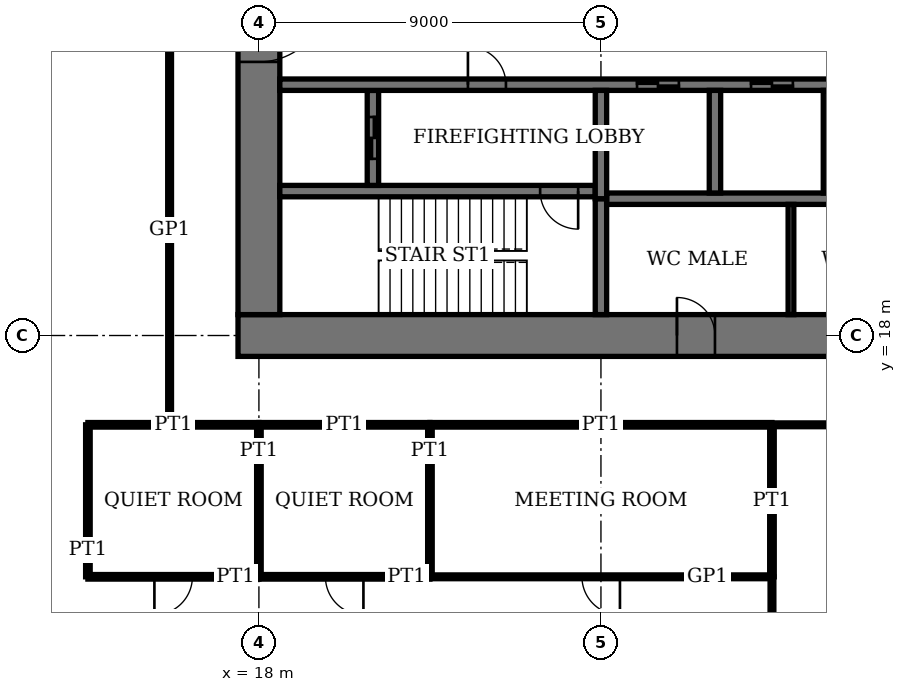
"""IFC4 building model, lengths in metres.
Left out: names, types, materials, properties, quantities, classifications, styles, units other than length and angle.
Written with IfcOpenShell. Run it as: python <this file> out.ifc"""

import sys

from ifc_helpers import new_model, si_unit, direction, frame, frame_2d, origin, place, context, subcontext, project, spatial, rectangle, extrude, element, fill, save


model = new_model("IFC4")
c1 = context("Model", 3, precision=1e-05, world=origin(), true_north=direction((0.0, 1.0)))
c2 = subcontext(c1, "Body", "Model", "MODEL_VIEW")
j1 = project(units=[si_unit("LENGTHUNIT", "METRE"), si_unit("PLANEANGLEUNIT", "RADIAN")], contexts=[c1])
p1 = place(None, origin())
s1 = spatial("IfcSite", under=j1, at=p1, CompositionType="ELEMENT")
p2 = place(p1, origin())
s2 = spatial("IfcBuilding", under=s1, at=p2, CompositionType="ELEMENT")
p3 = place(p2, frame((0.0, 0.0, 59.8)))
s3 = spatial("IfcBuildingStorey", under=s2, at=p3, CompositionType="ELEMENT", Elevation=59.8)
p4 = place(p3, frame((17.45, 18.0, 0.0), z_axis=(0.0, 0.0, 1.0), x_axis=(1.0, 0.0, 0.0)))
e1 = element("IfcWall", 1, at=p4, inside=s3, PredefinedType="SHEAR", context=c2, shape_type="SweptSolid", body=[
    extrude(rectangle(XDim=28.1, YDim=1.1, at=frame_2d((14.05, 0.0))), origin(), (0.0, 0.0, 1.0), 4.0),
])
p5 = place(p4, frame((11.55, 0.0, 0.0)))
e2 = element("IfcOpeningElement", 2, at=p5, cuts=e1, PredefinedType="OPENING", context=c2, shape_type="SweptSolid", body=[
    extrude(rectangle(XDim=1.0, YDim=2.4, at=frame_2d((0.5, 1.2))), frame((0.0, 0.56, 0.0), z_axis=(0.0, -1.0, 0.0), x_axis=(1.0, 0.0, 0.0)), (0.0, 0.0, 1.0), 1.12),
])
p6 = place(p4, frame((16.55, 0.0, 0.0)))
e3 = element("IfcOpeningElement", 3, at=p6, cuts=e1, PredefinedType="OPENING", context=c2, shape_type="SweptSolid", body=[
    extrude(rectangle(XDim=1.0, YDim=2.4, at=frame_2d((0.5, 1.2))), frame((0.0, 0.56, 0.0), z_axis=(0.0, -1.0, 0.0), x_axis=(1.0, 0.0, 0.0)), (0.0, 0.0, 1.0), 1.12),
])
p7 = place(p4, frame((20.0, 0.0, 0.0)))
e4 = element("IfcOpeningElement", 4, at=p7, cuts=e1, PredefinedType="OPENING", context=c2, shape_type="SweptSolid", body=[
    extrude(rectangle(XDim=1.1, YDim=2.4, at=frame_2d((0.55, 1.2))), frame((0.0, 0.56, 0.0), z_axis=(0.0, -1.0, 0.0), x_axis=(1.0, 0.0, 0.0)), (0.0, 0.0, 1.0), 1.12),
])
p8 = place(p4, frame((24.05, 0.0, 0.0)))
e5 = element("IfcOpeningElement", 5, at=p8, cuts=e1, PredefinedType="OPENING", context=c2, shape_type="SweptSolid", body=[
    extrude(rectangle(XDim=1.0, YDim=2.4, at=frame_2d((0.5, 1.2))), frame((0.0, 0.56, 0.0), z_axis=(0.0, -1.0, 0.0), x_axis=(1.0, 0.0, 0.0)), (0.0, 0.0, 1.0), 1.12),
])
p9 = place(p3, frame((18.0, 35.45, 0.0), z_axis=(0.0, 0.0, 1.0), x_axis=(0.0, -1.0, 0.0)))
e6 = element("IfcWall", 6, at=p9, inside=s3, PredefinedType="SHEAR", context=c2, shape_type="SweptSolid", body=[
    extrude(rectangle(XDim=16.9, YDim=1.1, at=frame_2d((8.45, 0.0))), origin(), (0.0, 0.0, 1.0), 4.0),
])
p10 = place(p9, frame((8.45, 0.0, 0.0)))
e7 = element("IfcOpeningElement", 7, at=p10, cuts=e6, PredefinedType="OPENING", context=c2, shape_type="SweptSolid", body=[
    extrude(rectangle(XDim=1.8, YDim=2.4, at=frame_2d((0.9, 1.2))), frame((0.0, 0.56, 0.0), z_axis=(0.0, -1.0, 0.0), x_axis=(1.0, 0.0, 0.0)), (0.0, 0.0, 1.0), 1.12),
])
p11 = place(p3, frame((18.55, 21.8, 0.0), z_axis=(0.0, 0.0, 1.0), x_axis=(1.0, 0.0, 0.0)))
e8 = element("IfcWall", 8, at=p11, inside=s3, PredefinedType="SHEAR", context=c2, shape_type="SweptSolid", body=[
    extrude(rectangle(XDim=8.3, YDim=0.3, at=frame_2d((4.15, 0.0))), origin(), (0.0, 0.0, 1.0), 4.0),
])
p12 = place(p11, frame((6.85, 0.0, 0.0)))
e9 = element("IfcOpeningElement", 9, at=p12, cuts=e8, PredefinedType="OPENING", context=c2, shape_type="SweptSolid", body=[
    extrude(rectangle(XDim=1.0, YDim=2.4, at=frame_2d((0.5, 1.2))), frame((0.0, 0.16, 0.0), z_axis=(0.0, -1.0, 0.0), x_axis=(1.0, 0.0, 0.0)), (0.0, 0.0, 1.0), 0.32),
])
p13 = place(p3, frame((27.0, 18.55, 0.0), z_axis=(0.0, 0.0, 1.0), x_axis=(0.0, 1.0, 0.0)))
e10 = element("IfcWall", 10, at=p13, inside=s3, PredefinedType="SHEAR", context=c2, shape_type="SweptSolid", body=[
    extrude(rectangle(XDim=3.05, YDim=0.3, at=frame_2d((1.525, 0.0))), origin(), (0.0, 0.0, 1.0), 4.0),
])
p14 = place(p3, frame((21.0, 21.95, 0.0), z_axis=(0.0, 0.0, 1.0), x_axis=(0.0, 1.0, 0.0)))
e11 = element("IfcWall", 11, at=p14, inside=s3, PredefinedType="SHEAR", context=c2, shape_type="SweptSolid", body=[
    extrude(rectangle(XDim=2.5, YDim=0.3, at=frame_2d((1.25, 0.0))), origin(), (0.0, 0.0, 1.0), 4.0),
])
p15 = place(p14, frame((0.7, 0.0, 0.0)))
e12 = element("IfcOpeningElement", 12, at=p15, cuts=e11, PredefinedType="OPENING", context=c2, shape_type="SweptSolid", body=[
    extrude(rectangle(XDim=1.1, YDim=2.4, at=frame_2d((0.55, 1.2))), frame((0.0, 0.16, 0.0), z_axis=(0.0, -1.0, 0.0), x_axis=(1.0, 0.0, 0.0)), (0.0, 0.0, 1.0), 0.32),
])
p16 = place(p3, frame((18.55, 24.6, 0.0), z_axis=(0.0, 0.0, 1.0), x_axis=(1.0, 0.0, 0.0)))
e13 = element("IfcWall", 13, at=p16, inside=s3, PredefinedType="SHEAR", context=c2, shape_type="SweptSolid", body=[
    extrude(rectangle(XDim=25.9, YDim=0.3, at=frame_2d((12.95, 0.0))), origin(), (0.0, 0.0, 1.0), 4.0),
])
p17 = place(p16, frame((4.95, 0.0, 0.0)))
e14 = element("IfcOpeningElement", 14, at=p17, cuts=e13, PredefinedType="OPENING", context=c2, shape_type="SweptSolid", body=[
    extrude(rectangle(XDim=1.0, YDim=2.4, at=frame_2d((0.5, 1.2))), frame((0.0, 0.16, 0.0), z_axis=(0.0, -1.0, 0.0), x_axis=(1.0, 0.0, 0.0)), (0.0, 0.0, 1.0), 0.32),
])
p18 = place(p16, frame((24.5, 0.0, 0.0)))
e15 = element("IfcOpeningElement", 15, at=p18, cuts=e13, PredefinedType="OPENING", context=c2, shape_type="SweptSolid", body=[
    extrude(rectangle(XDim=0.9, YDim=2.1, at=frame_2d((0.45, 1.05))), frame((0.0, 0.16, 0.0), z_axis=(0.0, -1.0, 0.0), x_axis=(1.0, 0.0, 0.0)), (0.0, 0.0, 1.0), 0.32),
])
p19 = place(p16, frame((9.4, 0.0, 0.0)))
e16 = element("IfcOpeningElement", 16, at=p19, cuts=e13, PredefinedType="OPENING", context=c2, shape_type="SweptSolid", body=[
    extrude(rectangle(XDim=1.1, YDim=2.4, at=frame_2d((0.55, 1.2))), frame((0.0, 0.16, 0.0), z_axis=(0.0, -1.0, 0.0), x_axis=(1.0, 0.0, 0.0)), (0.0, 0.0, 1.0), 0.32),
])
p20 = place(p16, frame((12.4, 0.0, 0.0)))
e17 = element("IfcOpeningElement", 17, at=p20, cuts=e13, PredefinedType="OPENING", context=c2, shape_type="SweptSolid", body=[
    extrude(rectangle(XDim=1.1, YDim=2.4, at=frame_2d((0.55, 1.2))), frame((0.0, 0.16, 0.0), z_axis=(0.0, -1.0, 0.0), x_axis=(1.0, 0.0, 0.0)), (0.0, 0.0, 1.0), 0.32),
])
p21 = place(p16, frame((15.4, 0.0, 0.0)))
e18 = element("IfcOpeningElement", 18, at=p21, cuts=e13, PredefinedType="OPENING", context=c2, shape_type="SweptSolid", body=[
    extrude(rectangle(XDim=1.1, YDim=2.4, at=frame_2d((0.55, 1.2))), frame((0.0, 0.16, 0.0), z_axis=(0.0, -1.0, 0.0), x_axis=(1.0, 0.0, 0.0)), (0.0, 0.0, 1.0), 0.32),
])
p22 = place(p16, frame((18.4, 0.0, 0.0)))
e19 = element("IfcOpeningElement", 19, at=p22, cuts=e13, PredefinedType="OPENING", context=c2, shape_type="SweptSolid", body=[
    extrude(rectangle(XDim=1.1, YDim=2.4, at=frame_2d((0.55, 1.2))), frame((0.0, 0.16, 0.0), z_axis=(0.0, -1.0, 0.0), x_axis=(1.0, 0.0, 0.0)), (0.0, 0.0, 1.0), 0.32),
])
p23 = place(p16, frame((21.3, 0.0, 0.0)))
e20 = element("IfcOpeningElement", 20, at=p23, cuts=e13, PredefinedType="OPENING", context=c2, shape_type="SweptSolid", body=[
    extrude(rectangle(XDim=1.3, YDim=2.4, at=frame_2d((0.65, 1.2))), frame((0.0, 0.16, 0.0), z_axis=(0.0, -1.0, 0.0), x_axis=(1.0, 0.0, 0.0)), (0.0, 0.0, 1.0), 0.32),
])
p24 = place(p3, frame((27.15, 21.6, 0.0), z_axis=(0.0, 0.0, 1.0), x_axis=(1.0, 0.0, 0.0)))
e21 = element("IfcWall", 21, at=p24, inside=s3, PredefinedType="SHEAR", context=c2, shape_type="SweptSolid", body=[
    extrude(rectangle(XDim=17.3, YDim=0.3, at=frame_2d((8.65, 0.0))), origin(), (0.0, 0.0, 1.0), 4.0),
])
for number, where, z_axis, x_axis in (
    (22, (30.0, 21.75, 0.0), (0.0, 0.0, 1.0), (0.0, 1.0, 0.0)),
    (23, (33.0, 21.75, 0.0), (0.0, 0.0, 1.0), (0.0, 1.0, 0.0)),
):
    element("IfcWall", number, at=place(p3, frame(where, z_axis=z_axis, x_axis=x_axis)), inside=s3, PredefinedType="SHEAR", context=c2, shape_type="SweptSolid", body=[
        extrude(rectangle(XDim=2.7, YDim=0.3, at=frame_2d((1.35, 0.0))), origin(), (0.0, 0.0, 1.0), 4.0),
    ])
p25 = place(p3, frame((27.0, 21.6, 0.0), z_axis=(0.0, 0.0, 1.0), x_axis=(0.0, 1.0, 0.0)))
e24 = element("IfcWall", 24, at=p25, inside=s3, PredefinedType="SHEAR", context=c2, shape_type="SweptSolid", body=[
    extrude(rectangle(XDim=2.85, YDim=0.3, at=frame_2d((1.425, 0.0))), origin(), (0.0, 0.0, 1.0), 4.0),
])
p26 = place(p3, frame((13.5, 11.65, 0.0), z_axis=(0.0, 0.0, 1.0), x_axis=(1.0, 0.0, 0.0)))
e25 = element("IfcWall", 25, at=p26, inside=s3, PredefinedType="PARTITIONING", context=c2, shape_type="SweptSolid", body=[
    extrude(rectangle(XDim=4.5, YDim=0.12, at=frame_2d((2.25, 0.0))), origin(), (0.0, 0.0, 1.0), 3.75),
])
p27 = place(p26, frame((1.75, 0.0, 0.0)))
e26 = element("IfcOpeningElement", 26, at=p27, cuts=e25, PredefinedType="OPENING", context=c2, shape_type="SweptSolid", body=[
    extrude(rectangle(XDim=1.0, YDim=2.4, at=frame_2d((0.5, 1.2))), frame((0.0, 0.07, 0.0), z_axis=(0.0, -1.0, 0.0), x_axis=(1.0, 0.0, 0.0)), (0.0, 0.0, 1.0), 0.14),
])
p28 = place(p3, frame((18.0, 11.65, 0.0), z_axis=(0.0, 0.0, 1.0), x_axis=(1.0, 0.0, 0.0)))
e27 = element("IfcWall", 27, at=p28, inside=s3, PredefinedType="PARTITIONING", context=c2, shape_type="SweptSolid", body=[
    extrude(rectangle(XDim=4.5, YDim=0.12, at=frame_2d((2.25, 0.0))), origin(), (0.0, 0.0, 1.0), 3.75),
])
p29 = place(p28, frame((1.75, 0.0, 0.0)))
e28 = element("IfcOpeningElement", 28, at=p29, cuts=e27, PredefinedType="OPENING", context=c2, shape_type="SweptSolid", body=[
    extrude(rectangle(XDim=1.0, YDim=2.4, at=frame_2d((0.5, 1.2))), frame((0.0, 0.07, 0.0), z_axis=(0.0, -1.0, 0.0), x_axis=(1.0, 0.0, 0.0)), (0.0, 0.0, 1.0), 0.14),
])
p30 = place(p3, frame((22.5, 11.65, 0.0), z_axis=(0.0, 0.0, 1.0), x_axis=(1.0, 0.0, 0.0)))
e29 = element("IfcWall", 29, at=p30, inside=s3, PredefinedType="PARTITIONING", context=c2, shape_type="SweptSolid", body=[
    extrude(rectangle(XDim=9.0, YDim=0.1, at=frame_2d((4.5, 0.0))), origin(), (0.0, 0.0, 1.0), 3.75),
])
p31 = place(p30, frame((4.0, 0.0, 0.0)))
e30 = element("IfcOpeningElement", 30, at=p31, cuts=e29, PredefinedType="OPENING", context=c2, shape_type="SweptSolid", body=[
    extrude(rectangle(XDim=1.0, YDim=2.4, at=frame_2d((0.5, 1.2))), frame((0.0, 0.06, 0.0), z_axis=(0.0, -1.0, 0.0), x_axis=(1.0, 0.0, 0.0)), (0.0, 0.0, 1.0), 0.12),
])
for number, where, z_axis, x_axis in (
    (31, (13.5, 15.65, 0.0), (0.0, 0.0, 1.0), (1.0, 0.0, 0.0)),
    (32, (18.0, 15.65, 0.0), (0.0, 0.0, 1.0), (1.0, 0.0, 0.0)),
):
    element("IfcWall", number, at=place(p3, frame(where, z_axis=z_axis, x_axis=x_axis)), inside=s3, PredefinedType="PARTITIONING", context=c2, shape_type="SweptSolid", body=[
        extrude(rectangle(XDim=4.5, YDim=0.12, at=frame_2d((2.25, 0.0))), origin(), (0.0, 0.0, 1.0), 3.75),
    ])
p32 = place(p3, frame((22.5, 15.65, 0.0), z_axis=(0.0, 0.0, 1.0), x_axis=(1.0, 0.0, 0.0)))
e33 = element("IfcWall", 33, at=p32, inside=s3, PredefinedType="PARTITIONING", context=c2, shape_type="SweptSolid", body=[
    extrude(rectangle(XDim=9.0, YDim=0.12, at=frame_2d((4.5, 0.0))), origin(), (0.0, 0.0, 1.0), 3.75),
])
p33 = place(p3, frame((31.5, 15.65, 0.0), z_axis=(0.0, 0.0, 1.0), x_axis=(1.0, 0.0, 0.0)))
e34 = element("IfcWall", 34, at=p33, inside=s3, PredefinedType="PARTITIONING", context=c2, shape_type="SweptSolid", body=[
    extrude(rectangle(XDim=9.0, YDim=0.1, at=frame_2d((4.5, 0.0))), origin(), (0.0, 0.0, 1.0), 3.75),
])
p34 = place(p33, frame((4.0, 0.0, 0.0)))
e35 = element("IfcOpeningElement", 35, at=p34, cuts=e34, PredefinedType="OPENING", context=c2, shape_type="SweptSolid", body=[
    extrude(rectangle(XDim=1.0, YDim=2.4, at=frame_2d((0.5, 1.2))), frame((0.0, 0.06, 0.0), z_axis=(0.0, -1.0, 0.0), x_axis=(1.0, 0.0, 0.0)), (0.0, 0.0, 1.0), 0.12),
])
p35 = place(p3, frame((13.5, 11.65, 0.0), z_axis=(0.0, 0.0, 1.0), x_axis=(0.0, 1.0, 0.0)))
e36 = element("IfcWall", 36, at=p35, inside=s3, PredefinedType="PARTITIONING", context=c2, shape_type="SweptSolid", body=[
    extrude(rectangle(XDim=4.0, YDim=0.12, at=frame_2d((2.0, 0.0))), origin(), (0.0, 0.0, 1.0), 3.75),
])
p36 = place(p3, frame((15.65, 15.65, 0.0), z_axis=(0.0, 0.0, 1.0), x_axis=(0.0, 1.0, 0.0)))
e37 = element("IfcWall", 37, at=p36, inside=s3, PredefinedType="PARTITIONING", context=c2, shape_type="SweptSolid", body=[
    extrude(rectangle(XDim=20.9, YDim=0.1, at=frame_2d((10.45, 0.0))), origin(), (0.0, 0.0, 1.0), 3.75),
])
p37 = place(p36, frame((9.95, 0.0, 0.0)))
e38 = element("IfcOpeningElement", 38, at=p37, cuts=e37, PredefinedType="OPENING", context=c2, shape_type="SweptSolid", body=[
    extrude(rectangle(XDim=1.0, YDim=2.4, at=frame_2d((0.5, 1.2))), frame((0.0, 0.06, 0.0), z_axis=(0.0, -1.0, 0.0), x_axis=(1.0, 0.0, 0.0)), (0.0, 0.0, 1.0), 0.12),
])
p38 = place(p3, frame((18.0, 11.65, 0.0), z_axis=(0.0, 0.0, 1.0), x_axis=(0.0, 1.0, 0.0)))
e39 = element("IfcWall", 39, at=p38, inside=s3, PredefinedType="PARTITIONING", context=c2, shape_type="SweptSolid", body=[
    extrude(rectangle(XDim=4.0, YDim=0.12, at=frame_2d((2.0, 0.0))), origin(), (0.0, 0.0, 1.0), 3.05),
])
for number, where, z_axis, x_axis in (
    (40, (22.5, 11.65, 0.0), (0.0, 0.0, 1.0), (0.0, 1.0, 0.0)),
    (41, (31.5, 11.65, 0.0), (0.0, 0.0, 1.0), (0.0, 1.0, 0.0)),
):
    element("IfcWall", number, at=place(p3, frame(where, z_axis=z_axis, x_axis=x_axis)), inside=s3, PredefinedType="PARTITIONING", context=c2, shape_type="SweptSolid", body=[
        extrude(rectangle(XDim=4.0, YDim=0.12, at=frame_2d((2.0, 0.0))), origin(), (0.0, 0.0, 1.0), 3.75),
    ])
p39 = place(p3, frame((31.5, 0.31, 0.0), z_axis=(0.0, 0.0, 1.0), x_axis=(0.0, 1.0, 0.0)))
e42 = element("IfcWall", 42, at=p39, inside=s3, PredefinedType="PARTITIONING", context=c2, shape_type="SweptSolid", body=[
    extrude(rectangle(XDim=11.34, YDim=0.1, at=frame_2d((5.67, 0.0))), origin(), (0.0, 0.0, 1.0), 3.75),
])
p40 = place(p3, frame((32.0, 18.55, 0.0), z_axis=(0.0, 0.0, 1.0), x_axis=(0.0, 1.0, 0.0)))
e43 = element("IfcWall", 43, at=p40, inside=s3, PredefinedType="PARTITIONING", context=c2, shape_type="SweptSolid", body=[
    extrude(rectangle(XDim=2.9, YDim=0.15, at=frame_2d((1.45, 0.0))), origin(), (0.0, 0.0, 1.0), 3.75),
])
p41 = place(p10, origin())
e44 = element("IfcDoor", 44, at=p41, inside=s3, OperationType="DOUBLE_DOOR_DOUBLE_SWING", PredefinedType="DOOR", context=c2, shape_type="SweptSolid", body=[
    extrude(rectangle(XDim=1.8, YDim=2.4, at=frame_2d((0.9, 1.2))), frame((0.0, 0.03, 0.0), z_axis=(0.0, -1.0, 0.0), x_axis=(1.0, 0.0, 0.0)), (0.0, 0.0, 1.0), 0.06),
    extrude(rectangle(XDim=0.04, YDim=2.4, at=frame_2d((0.02, 1.2))), frame((0.0, 0.55, 0.0), z_axis=(0.0, -1.0, 0.0), x_axis=(1.0, 0.0, 0.0)), (0.0, 0.0, 1.0), 1.1),
    extrude(rectangle(XDim=0.04, YDim=2.4, at=frame_2d((1.78, 1.2))), frame((0.0, 0.55, 0.0), z_axis=(0.0, -1.0, 0.0), x_axis=(1.0, 0.0, 0.0)), (0.0, 0.0, 1.0), 1.1),
    extrude(rectangle(XDim=1.8, YDim=0.04, at=frame_2d((0.9, 2.38))), frame((0.0, 0.55, 0.0), z_axis=(0.0, -1.0, 0.0), x_axis=(1.0, 0.0, 0.0)), (0.0, 0.0, 1.0), 1.1),
])
fill(e7, e44)
p42 = place(p5, origin())
e45 = element("IfcDoor", 45, at=p42, inside=s3, OperationType="SINGLE_SWING_RIGHT", PredefinedType="DOOR", context=c2, shape_type="SweptSolid", body=[
    extrude(rectangle(XDim=1.0, YDim=2.4, at=frame_2d((0.5, 1.2))), frame((0.0, 0.025, 0.0), z_axis=(0.0, -1.0, 0.0), x_axis=(1.0, 0.0, 0.0)), (0.0, 0.0, 1.0), 0.05),
    extrude(rectangle(XDim=0.04, YDim=2.4, at=frame_2d((0.02, 1.2))), frame((0.0, 0.4, 0.0), z_axis=(0.0, -1.0, 0.0), x_axis=(1.0, 0.0, 0.0)), (0.0, 0.0, 1.0), 0.8),
    extrude(rectangle(XDim=0.04, YDim=2.4, at=frame_2d((0.98, 1.2))), frame((0.0, 0.4, 0.0), z_axis=(0.0, -1.0, 0.0), x_axis=(1.0, 0.0, 0.0)), (0.0, 0.0, 1.0), 0.8),
    extrude(rectangle(XDim=1.0, YDim=0.04, at=frame_2d((0.5, 2.38))), frame((0.0, 0.4, 0.0), z_axis=(0.0, -1.0, 0.0), x_axis=(1.0, 0.0, 0.0)), (0.0, 0.0, 1.0), 0.8),
])
fill(e2, e45)
p43 = place(p12, origin())
e46 = element("IfcDoor", 46, at=p43, inside=s3, OperationType="SINGLE_SWING_RIGHT", PredefinedType="DOOR", context=c2, shape_type="SweptSolid", body=[
    extrude(rectangle(XDim=1.0, YDim=2.4, at=frame_2d((0.5, 1.2))), frame((0.0, 0.03, 0.0), z_axis=(0.0, -1.0, 0.0), x_axis=(1.0, 0.0, 0.0)), (0.0, 0.0, 1.0), 0.06),
])
fill(e9, e46)
p44 = place(p17, origin())
e47 = element("IfcDoor", 47, at=p44, inside=s3, OperationType="SINGLE_SWING_RIGHT", PredefinedType="DOOR", context=c2, shape_type="SweptSolid", body=[
    extrude(rectangle(XDim=1.0, YDim=2.4, at=frame_2d((0.5, 1.2))), frame((0.0, 0.03, 0.0), z_axis=(0.0, -1.0, 0.0), x_axis=(1.0, 0.0, 0.0)), (0.0, 0.0, 1.0), 0.06),
])
fill(e14, e47)
p45 = place(p27, origin())
e48 = element("IfcDoor", 48, at=p45, inside=s3, OperationType="SINGLE_SWING_LEFT", PredefinedType="DOOR", context=c2, shape_type="SweptSolid", body=[
    extrude(rectangle(XDim=1.0, YDim=2.4, at=frame_2d((0.5, 1.2))), frame((0.0, 0.025, 0.0), z_axis=(0.0, -1.0, 0.0), x_axis=(1.0, 0.0, 0.0)), (0.0, 0.0, 1.0), 0.05),
])
fill(e26, e48)
p46 = place(p29, origin())
e49 = element("IfcDoor", 49, at=p46, inside=s3, OperationType="SINGLE_SWING_RIGHT", PredefinedType="DOOR", context=c2, shape_type="SweptSolid", body=[
    extrude(rectangle(XDim=1.0, YDim=2.4, at=frame_2d((0.5, 1.2))), frame((0.0, 0.025, 0.0), z_axis=(0.0, -1.0, 0.0), x_axis=(1.0, 0.0, 0.0)), (0.0, 0.0, 1.0), 0.05),
])
fill(e28, e49)
p47 = place(p31, origin())
e50 = element("IfcDoor", 50, at=p47, inside=s3, OperationType="SINGLE_SWING_RIGHT", PredefinedType="DOOR", context=c2, shape_type="SweptSolid", body=[
    extrude(rectangle(XDim=1.0, YDim=2.4, at=frame_2d((0.5, 1.2))), frame((0.0, 0.02, 0.0), z_axis=(0.0, -1.0, 0.0), x_axis=(1.0, 0.0, 0.0)), (0.0, 0.0, 1.0), 0.04),
])
fill(e30, e50)
p48 = place(p19, origin())
e51 = element("IfcDoor", 51, at=p48, inside=s3, OperationType="DOUBLE_DOOR_SLIDING", PredefinedType="DOOR", context=c2, shape_type="SweptSolid", body=[
    extrude(rectangle(XDim=1.1, YDim=2.4, at=frame_2d((0.55, 1.2))), frame((0.0, 0.02, 0.0), z_axis=(0.0, -1.0, 0.0), x_axis=(1.0, 0.0, 0.0)), (0.0, 0.0, 1.0), 0.04),
])
fill(e16, e51)
p49 = place(p20, origin())
e52 = element("IfcDoor", 52, at=p49, inside=s3, OperationType="DOUBLE_DOOR_SLIDING", PredefinedType="DOOR", context=c2, shape_type="SweptSolid", body=[
    extrude(rectangle(XDim=1.1, YDim=2.4, at=frame_2d((0.55, 1.2))), frame((0.0, 0.02, 0.0), z_axis=(0.0, -1.0, 0.0), x_axis=(1.0, 0.0, 0.0)), (0.0, 0.0, 1.0), 0.04),
])
fill(e17, e52)
p50 = place(p15, origin())
e53 = element("IfcDoor", 53, at=p50, inside=s3, OperationType="DOUBLE_DOOR_SLIDING", PredefinedType="DOOR", context=c2, shape_type="SweptSolid", body=[
    extrude(rectangle(XDim=1.1, YDim=2.4, at=frame_2d((0.55, 1.2))), frame((0.0, 0.03, 0.0), z_axis=(0.0, -1.0, 0.0), x_axis=(1.0, 0.0, 0.0)), (0.0, 0.0, 1.0), 0.06),
])
fill(e12, e53)
save(model, sys.argv[1])
